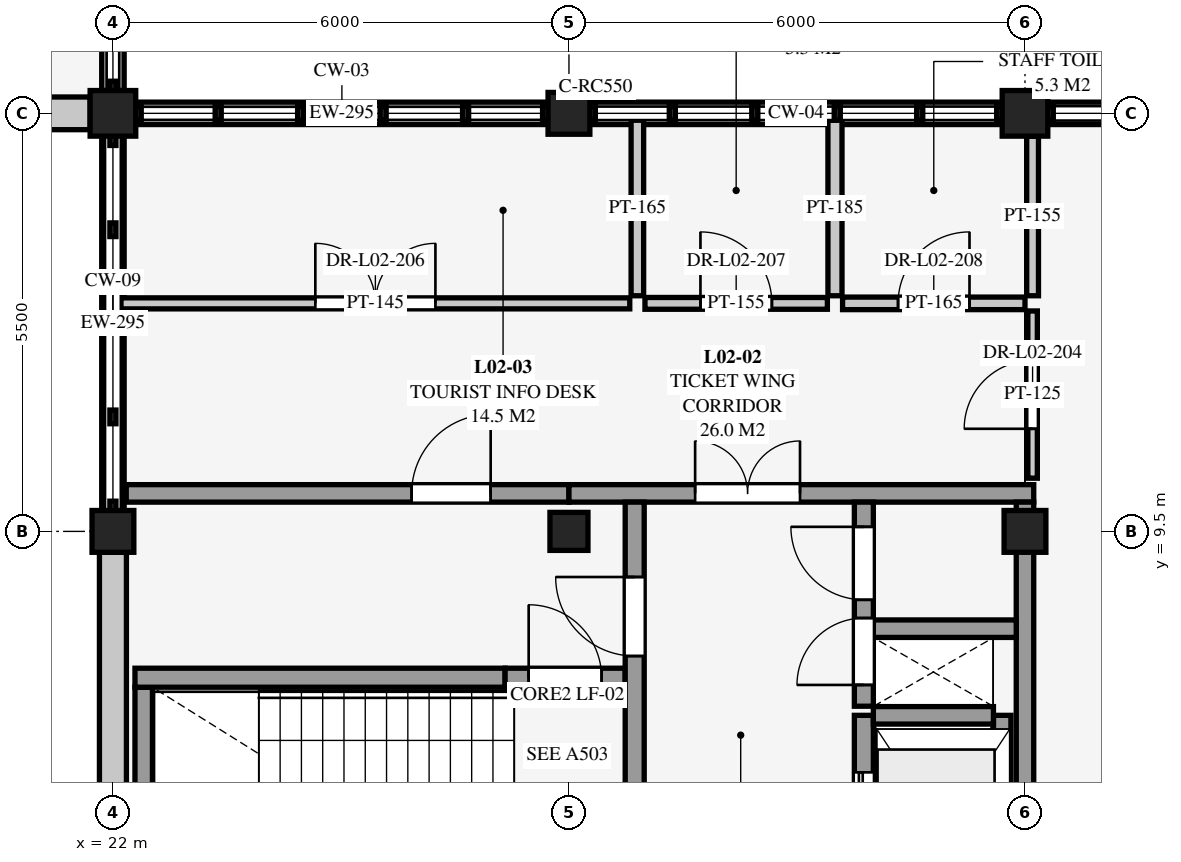
"""IFC4 building model, lengths in metres.
Left out: names, types, materials, properties, quantities, classifications, styles, units other than length and angle.
Written with IfcOpenShell. Run it as: python <this file> out.ifc"""

import sys

from ifc_helpers import new_model, si_unit, direction, frame, frame_2d, origin, origin_2d, place, context, subcontext, project, spatial, rectangle, extrude, element, fill, save


model = new_model("IFC4")
c1 = context("Model", 3, precision=1e-05, world=origin(), true_north=direction((0.0, 1.0)))
c2 = subcontext(c1, "Body", "Model", "MODEL_VIEW")
j1 = project(units=[si_unit("LENGTHUNIT", "METRE"), si_unit("PLANEANGLEUNIT", "RADIAN")], contexts=[c1])
p1 = place(None, origin())
s1 = spatial("IfcSite", under=j1, at=p1, CompositionType="ELEMENT")
p2 = place(p1, origin())
s2 = spatial("IfcBuilding", under=s1, at=p2, CompositionType="ELEMENT")
p3 = place(p2, frame((0.0, 0.0, 4.5)))
s3 = spatial("IfcBuildingStorey", under=s2, at=p3, CompositionType="ELEMENT", Elevation=4.5)
p4 = place(p3, frame((22.0, 9.5, 0.0), z_axis=(0.0, 0.0, 1.0), x_axis=(1.0, 0.0, 0.0)))
e1 = element("IfcColumn", 1, at=p4, inside=s3, PredefinedType="COLUMN", context=c2, shape_type="SweptSolid", body=[
    extrude(rectangle(XDim=0.55, YDim=0.55, at=origin_2d()), origin(), (0.0, 0.0, 1.0), 4.5),
])
p5 = place(p3, frame((22.0, 15.0, 0.0), z_axis=(0.0, 0.0, 1.0), x_axis=(1.0, 0.0, 0.0)))
e2 = element("IfcColumn", 2, at=p5, inside=s3, PredefinedType="COLUMN", context=c2, shape_type="SweptSolid", body=[
    extrude(rectangle(XDim=0.6, YDim=0.6, at=origin_2d()), origin(), (0.0, 0.0, 1.0), 4.5),
])
p6 = place(p3, frame((28.0, 9.5, 0.0), z_axis=(0.0, 0.0, 1.0), x_axis=(1.0, 0.0, 0.0)))
e3 = element("IfcColumn", 3, at=p6, inside=s3, PredefinedType="COLUMN", context=c2, shape_type="SweptSolid", body=[
    extrude(rectangle(XDim=0.5, YDim=0.5, at=origin_2d()), origin(), (0.0, 0.0, 1.0), 4.5),
])
for number, where, z_axis, x_axis in (
    (4, (28.0, 15.0, 0.0), (0.0, 0.0, 1.0), (1.0, 0.0, 0.0)),
    (5, (34.0, 9.5, 0.0), (0.0, 0.0, 1.0), (1.0, 0.0, 0.0)),
):
    element("IfcColumn", number, at=place(p3, frame(where, z_axis=z_axis, x_axis=x_axis)), inside=s3, PredefinedType="COLUMN", context=c2, shape_type="SweptSolid", body=[
        extrude(rectangle(XDim=0.55, YDim=0.55, at=origin_2d()), origin(), (0.0, 0.0, 1.0), 4.5),
    ])
p7 = place(p3, frame((34.0, 15.0, 0.0), z_axis=(0.0, 0.0, 1.0), x_axis=(1.0, 0.0, 0.0)))
e6 = element("IfcColumn", 6, at=p7, inside=s3, PredefinedType="COLUMN", context=c2, shape_type="SweptSolid", body=[
    extrude(rectangle(XDim=0.6, YDim=0.6, at=origin_2d()), origin(), (0.0, 0.0, 1.0), 4.5),
])
p8 = place(p3, frame((22.3, 15.0, 0.0), z_axis=(0.0, 0.0, 1.0), x_axis=(1.0, 0.0, 0.0)))
e7 = element("IfcWall", 7, at=p8, inside=s3, PredefinedType="SOLIDWALL", context=c2, shape_type="SweptSolid", body=[
    extrude(rectangle(XDim=5.425, YDim=0.295, at=frame_2d((2.712, 0.0))), origin(), (0.0, 0.0, 1.0), 0.26),
])
p9 = place(p3, frame((28.275, 15.0, 0.0), z_axis=(0.0, 0.0, 1.0), x_axis=(1.0, 0.0, 0.0)))
e8 = element("IfcWall", 8, at=p9, inside=s3, PredefinedType="SOLIDWALL", context=c2, shape_type="SweptSolid", body=[
    extrude(rectangle(XDim=5.425, YDim=0.295, at=frame_2d((2.712, 0.0))), origin(), (0.0, 0.0, 1.0), 0.31),
])
p10 = place(p3, frame((34.3, 15.0, 0.0), z_axis=(0.0, 0.0, 1.0), x_axis=(1.0, 0.0, 0.0)))
e9 = element("IfcWall", 9, at=p10, inside=s3, PredefinedType="SOLIDWALL", context=c2, shape_type="SweptSolid", body=[
    extrude(rectangle(XDim=5.3, YDim=0.295, at=frame_2d((2.65, 0.0))), origin(), (0.0, 0.0, 1.0), 0.41),
])
p11 = place(p3, frame((22.0, 4.25, 0.0), z_axis=(0.0, 0.0, 1.0), x_axis=(0.0, 1.0, 0.0)))
e10 = element("IfcWall", 10, at=p11, inside=s3, PredefinedType="SOLIDWALL", context=c2, shape_type="SweptSolid", body=[
    extrude(rectangle(XDim=4.975, YDim=0.355, at=frame_2d((2.488, 0.0))), origin(), (0.0, 0.0, 1.0), 3.809),
])
p12 = place(p3, frame((22.0, 9.775, 0.0), z_axis=(0.0, 0.0, 1.0), x_axis=(0.0, 1.0, 0.0)))
e11 = element("IfcWall", 11, at=p12, inside=s3, PredefinedType="SOLIDWALL", context=c2, shape_type="SweptSolid", body=[
    extrude(rectangle(XDim=4.925, YDim=0.295, at=frame_2d((2.462, 0.0))), origin(), (0.0, 0.0, 1.0), 0.16),
])
p13 = place(p3, frame((21.7, 15.0, 0.0), z_axis=(0.0, 0.0, 1.0), x_axis=(-1.0, 0.0, 0.0)))
e12 = element("IfcWall", 12, at=p13, inside=s3, PredefinedType="SOLIDWALL", context=c2, shape_type="SweptSolid", body=[
    extrude(rectangle(XDim=5.45, YDim=0.43, at=frame_2d((2.725, 0.0))), origin(), (0.0, 0.0, 1.0), 3.809),
])
p14 = place(p13, frame((1.925, 0.0, 1.25)))
e13 = element("IfcOpeningElement", 13, at=p14, cuts=e12, PredefinedType="OPENING", context=c2, shape_type="SweptSolid", body=[
    extrude(rectangle(XDim=1.6, YDim=1.5, at=frame_2d((0.8, 0.75))), frame((0.0, 0.225, 0.0), z_axis=(0.0, -1.0, 0.0), x_axis=(1.0, 0.0, 0.0)), (0.0, 0.0, 1.0), 0.45),
])
p15 = place(p3, frame((22.0, 20.675, 0.0), z_axis=(0.0, 0.0, 1.0), x_axis=(0.0, -1.0, 0.0)))
e14 = element("IfcWall", 14, at=p15, inside=s3, PredefinedType="SOLIDWALL", context=c2, shape_type="SweptSolid", body=[
    extrude(rectangle(XDim=5.375, YDim=0.295, at=frame_2d((2.688, 0.0))), origin(), (0.0, 0.0, 1.0), 0.21),
])
p16 = place(p3, frame((22.175, 10.0, 0.0), z_axis=(0.0, 0.0, 1.0), x_axis=(1.0, 0.0, 0.0)))
e15 = element("IfcWall", 15, at=p16, inside=s3, PredefinedType="SHEAR", context=c2, shape_type="SweptSolid", body=[
    extrude(rectangle(XDim=5.825, YDim=0.23, at=frame_2d((2.913, 0.0))), origin(), (0.0, 0.0, 1.0), 4.216),
])
p17 = place(p16, frame((3.755, 0.0, 0.0)))
e16 = element("IfcOpeningElement", 16, at=p17, cuts=e15, PredefinedType="OPENING", context=c2, shape_type="SweptSolid", body=[
    extrude(rectangle(XDim=1.04, YDim=2.14, at=frame_2d((0.52, 1.07))), frame((0.0, 0.125, 0.0), z_axis=(0.0, -1.0, 0.0), x_axis=(1.0, 0.0, 0.0)), (0.0, 0.0, 1.0), 0.25),
])
p18 = place(p3, frame((28.0, 10.0, 0.0), z_axis=(0.0, 0.0, 1.0), x_axis=(1.0, 0.0, 0.0)))
e17 = element("IfcWall", 17, at=p18, inside=s3, PredefinedType="SHEAR", context=c2, shape_type="SweptSolid", body=[
    extrude(rectangle(XDim=6.115, YDim=0.23, at=frame_2d((3.058, 0.0))), origin(), (0.0, 0.0, 1.0), 4.216),
])
p19 = place(p18, frame((1.66, 0.0, 0.0)))
e18 = element("IfcOpeningElement", 18, at=p19, cuts=e17, PredefinedType="OPENING", context=c2, shape_type="SweptSolid", body=[
    extrude(rectangle(XDim=1.38, YDim=2.16, at=frame_2d((0.69, 1.08))), frame((0.0, 0.125, 0.0), z_axis=(0.0, -1.0, 0.0), x_axis=(1.0, 0.0, 0.0)), (0.0, 0.0, 1.0), 0.25),
])
p20 = place(p3, frame((34.0, 4.25, 0.0), z_axis=(0.0, 0.0, 1.0), x_axis=(0.0, 1.0, 0.0)))
e19 = element("IfcWall", 19, at=p20, inside=s3, PredefinedType="SHEAR", context=c2, shape_type="SweptSolid", body=[
    extrude(rectangle(XDim=5.635, YDim=0.23, at=frame_2d((2.817, 0.0))), origin(), (0.0, 0.0, 1.0), 4.216),
])
p21 = place(p3, frame((22.405, 4.115, 0.0), z_axis=(0.0, 0.0, 1.0), x_axis=(0.0, 1.0, 0.0)))
e20 = element("IfcWall", 20, at=p21, inside=s3, PredefinedType="SHEAR", context=c2, shape_type="SweptSolid", body=[
    extrude(rectangle(XDim=3.335, YDim=0.23, at=frame_2d((1.667, 0.0))), origin(), (0.0, 0.0, 1.0), 4.5),
])
p22 = place(p3, frame((22.29, 7.575, 0.0), z_axis=(0.0, 0.0, 1.0), x_axis=(1.0, 0.0, 0.0)))
e21 = element("IfcWall", 21, at=p22, inside=s3, PredefinedType="SHEAR", context=c2, shape_type="SweptSolid", body=[
    extrude(rectangle(XDim=4.87, YDim=0.25, at=frame_2d((2.435, 0.0))), origin(), (0.0, 0.0, 1.0), 4.5),
])
p23 = place(p3, frame((27.16, 7.575, 0.0), z_axis=(0.0, 0.0, 1.0), x_axis=(1.0, 0.0, 0.0)))
e22 = element("IfcWall", 22, at=p23, inside=s3, PredefinedType="SHEAR", context=c2, shape_type="SweptSolid", body=[
    extrude(rectangle(XDim=1.58, YDim=0.25, at=frame_2d((0.79, 0.0))), origin(), (0.0, 0.0, 1.0), 4.216),
])
p24 = place(p23, frame((0.31, 0.0, 0.0)))
e23 = element("IfcOpeningElement", 23, at=p24, cuts=e22, PredefinedType="OPENING", context=c2, shape_type="SweptSolid", body=[
    extrude(rectangle(XDim=0.96, YDim=2.12, at=frame_2d((0.48, 1.06))), frame((0.0, 0.135, 0.0), z_axis=(0.0, -1.0, 0.0), x_axis=(1.0, 0.0, 0.0)), (0.0, 0.0, 1.0), 0.27),
])
p25 = place(p3, frame((28.865, 4.175, 0.0), z_axis=(0.0, 0.0, 1.0), x_axis=(0.0, 1.0, 0.0)))
e24 = element("IfcWall", 24, at=p25, inside=s3, PredefinedType="SHEAR", context=c2, shape_type="SweptSolid", body=[
    extrude(rectangle(XDim=5.71, YDim=0.25, at=frame_2d((2.855, 0.0))), origin(), (0.0, 0.0, 1.0), 4.216),
])
p26 = place(p25, frame((3.685, 0.0, 0.0)))
e25 = element("IfcOpeningElement", 25, at=p26, cuts=e24, PredefinedType="OPENING", context=c2, shape_type="SweptSolid", body=[
    extrude(rectangle(XDim=1.04, YDim=2.14, at=frame_2d((0.52, 1.07))), frame((0.0, 0.135, 0.0), z_axis=(0.0, -1.0, 0.0), x_axis=(1.0, 0.0, 0.0)), (0.0, 0.0, 1.0), 0.27),
])
p27 = place(p3, frame((31.88, 4.115, 0.0), z_axis=(0.0, 0.0, 1.0), x_axis=(0.0, 1.0, 0.0)))
e26 = element("IfcWall", 26, at=p27, inside=s3, PredefinedType="SHEAR", context=c2, shape_type="SweptSolid", body=[
    extrude(rectangle(XDim=2.965, YDim=0.25, at=frame_2d((1.482, 0.0))), origin(), (0.0, 0.0, 1.0), 4.5),
])
p28 = place(p27, frame((1.055, 0.0, 0.0)))
e27 = element("IfcOpeningElement", 27, at=p28, cuts=e26, PredefinedType="OPENING", context=c2, shape_type="SweptSolid", body=[
    extrude(rectangle(XDim=1.16, YDim=2.18, at=frame_2d((0.58, 1.09))), frame((0.0, 0.135, 0.0), z_axis=(0.0, -1.0, 0.0), x_axis=(1.0, 0.0, 0.0)), (0.0, 0.0, 1.0), 0.27),
])
p29 = place(p3, frame((33.7, 4.115, 0.0), z_axis=(0.0, 0.0, 1.0), x_axis=(0.0, 1.0, 0.0)))
e28 = element("IfcWall", 28, at=p29, inside=s3, PredefinedType="SHEAR", context=c2, shape_type="SweptSolid", body=[
    extrude(rectangle(XDim=2.965, YDim=0.23, at=frame_2d((1.482, 0.0))), origin(), (0.0, 0.0, 1.0), 4.5),
])
p30 = place(p3, frame((32.005, 7.08, 0.0), z_axis=(0.0, 0.0, 1.0), x_axis=(1.0, 0.0, 0.0)))
e29 = element("IfcWall", 29, at=p30, inside=s3, PredefinedType="SHEAR", context=c2, shape_type="SweptSolid", body=[
    extrude(rectangle(XDim=1.58, YDim=0.23, at=frame_2d((0.79, 0.0))), origin(), (0.0, 0.0, 1.0), 4.5),
])
p31 = place(p3, frame((31.88, 7.2, 0.0), z_axis=(0.0, 0.0, 1.0), x_axis=(0.0, 1.0, 0.0)))
e30 = element("IfcWall", 30, at=p31, inside=s3, PredefinedType="SHEAR", context=c2, shape_type="SweptSolid", body=[
    extrude(rectangle(XDim=2.685, YDim=0.25, at=frame_2d((1.343, 0.0))), origin(), (0.0, 0.0, 1.0), 4.216),
])
p32 = place(p31, frame((0.28, 0.0, 0.0)))
e31 = element("IfcOpeningElement", 31, at=p32, cuts=e30, PredefinedType="OPENING", context=c2, shape_type="SweptSolid", body=[
    extrude(rectangle(XDim=0.88, YDim=2.08, at=frame_2d((0.44, 1.04))), frame((0.0, 0.135, 0.0), z_axis=(0.0, -1.0, 0.0), x_axis=(1.0, 0.0, 0.0)), (0.0, 0.0, 1.0), 0.27),
])
p33 = place(p31, frame((1.4, 0.0, 0.0)))
e32 = element("IfcOpeningElement", 32, at=p33, cuts=e30, PredefinedType="OPENING", context=c2, shape_type="SweptSolid", body=[
    extrude(rectangle(XDim=0.96, YDim=2.12, at=frame_2d((0.48, 1.06))), frame((0.0, 0.135, 0.0), z_axis=(0.0, -1.0, 0.0), x_axis=(1.0, 0.0, 0.0)), (0.0, 0.0, 1.0), 0.27),
])
p34 = place(p3, frame((32.005, 8.22, 0.0), z_axis=(0.0, 0.0, 1.0), x_axis=(1.0, 0.0, 0.0)))
e33 = element("IfcWall", 33, at=p34, inside=s3, PredefinedType="SHEAR", context=c2, shape_type="SweptSolid", body=[
    extrude(rectangle(XDim=1.88, YDim=0.23, at=frame_2d((0.94, 0.0))), origin(), (0.0, 0.0, 1.0), 4.216),
])
p35 = place(p3, frame((34.1, 10.2, 0.0), z_axis=(0.0, 0.0, 1.0), x_axis=(0.0, 1.0, 0.0)))
e34 = element("IfcWall", 34, at=p35, inside=s3, PredefinedType="PARTITIONING", context=c2, shape_type="SweptSolid", body=[
    extrude(rectangle(XDim=2.2, YDim=0.125, at=frame_2d((1.1, 0.0))), origin(), (0.0, 0.0, 1.0), 4.216),
])
p36 = place(p35, frame((0.65, 0.0, 0.0)))
e35 = element("IfcOpeningElement", 35, at=p36, cuts=e34, PredefinedType="OPENING", context=c2, shape_type="SweptSolid", body=[
    extrude(rectangle(XDim=0.9, YDim=2.1, at=frame_2d((0.45, 1.05))), frame((0.0, 0.073, 0.0), z_axis=(0.0, -1.0, 0.0), x_axis=(1.0, 0.0, 0.0)), (0.0, 0.0, 1.0), 0.145),
])
p37 = place(p3, frame((34.1, 12.6, 0.0), z_axis=(0.0, 0.0, 1.0), x_axis=(0.0, 1.0, 0.0)))
e36 = element("IfcWall", 36, at=p37, inside=s3, PredefinedType="PARTITIONING", context=c2, shape_type="SweptSolid", body=[
    extrude(rectangle(XDim=2.098, YDim=0.155, at=frame_2d((1.049, 0.0))), origin(), (0.0, 0.0, 1.0), 4.216),
])
p38 = place(p3, frame((22.106, 12.5, 0.0), z_axis=(0.0, 0.0, 1.0), x_axis=(1.0, 0.0, 0.0)))
e37 = element("IfcWall", 37, at=p38, inside=s3, PredefinedType="PARTITIONING", context=c2, shape_type="SweptSolid", body=[
    extrude(rectangle(XDim=6.694, YDim=0.145, at=frame_2d((3.347, 0.0))), origin(), (0.0, 0.0, 1.0), 4.216),
])
p39 = place(p38, frame((2.557, 0.0, 0.0)))
e38 = element("IfcOpeningElement", 38, at=p39, cuts=e37, PredefinedType="OPENING", context=c2, shape_type="SweptSolid", body=[
    extrude(rectangle(XDim=1.58, YDim=2.2, at=frame_2d((0.79, 1.1))), frame((0.0, 0.083, 0.0), z_axis=(0.0, -1.0, 0.0), x_axis=(1.0, 0.0, 0.0)), (0.0, 0.0, 1.0), 0.165),
])
p40 = place(p3, frame((29.0, 12.5, 0.0), z_axis=(0.0, 0.0, 1.0), x_axis=(1.0, 0.0, 0.0)))
e39 = element("IfcWall", 39, at=p40, inside=s3, PredefinedType="PARTITIONING", context=c2, shape_type="SweptSolid", body=[
    extrude(rectangle(XDim=2.4, YDim=0.155, at=frame_2d((1.2, 0.0))), origin(), (0.0, 0.0, 1.0), 4.216),
])
p41 = place(p40, frame((0.73, 0.0, 0.0)))
e40 = element("IfcOpeningElement", 40, at=p41, cuts=e39, PredefinedType="OPENING", context=c2, shape_type="SweptSolid", body=[
    extrude(rectangle(XDim=0.94, YDim=2.1, at=frame_2d((0.47, 1.05))), frame((0.0, 0.088, 0.0), z_axis=(0.0, -1.0, 0.0), x_axis=(1.0, 0.0, 0.0)), (0.0, 0.0, 1.0), 0.175),
])
p42 = place(p3, frame((31.6, 12.5, 0.0), z_axis=(0.0, 0.0, 1.0), x_axis=(1.0, 0.0, 0.0)))
e41 = element("IfcWall", 41, at=p42, inside=s3, PredefinedType="PARTITIONING", context=c2, shape_type="SweptSolid", body=[
    extrude(rectangle(XDim=2.4, YDim=0.165, at=frame_2d((1.2, 0.0))), origin(), (0.0, 0.0, 1.0), 4.216),
])
p43 = place(p42, frame((0.73, 0.0, 0.0)))
e42 = element("IfcOpeningElement", 42, at=p43, cuts=e41, PredefinedType="OPENING", context=c2, shape_type="SweptSolid", body=[
    extrude(rectangle(XDim=0.94, YDim=2.1, at=frame_2d((0.47, 1.05))), frame((0.0, 0.093, 0.0), z_axis=(0.0, -1.0, 0.0), x_axis=(1.0, 0.0, 0.0)), (0.0, 0.0, 1.0), 0.185),
])
p44 = place(p3, frame((28.9, 12.6, 0.0), z_axis=(0.0, 0.0, 1.0), x_axis=(0.0, 1.0, 0.0)))
e43 = element("IfcWall", 43, at=p44, inside=s3, PredefinedType="PARTITIONING", context=c2, shape_type="SweptSolid", body=[
    extrude(rectangle(XDim=2.309, YDim=0.165, at=frame_2d((1.154, 0.0))), origin(), (0.0, 0.0, 1.0), 4.216),
])
p45 = place(p3, frame((31.5, 12.6, 0.0), z_axis=(0.0, 0.0, 1.0), x_axis=(0.0, 1.0, 0.0)))
e44 = element("IfcWall", 44, at=p45, inside=s3, PredefinedType="PARTITIONING", context=c2, shape_type="SweptSolid", body=[
    extrude(rectangle(XDim=2.309, YDim=0.185, at=frame_2d((1.154, 0.0))), origin(), (0.0, 0.0, 1.0), 4.216),
])
p46 = place(p17, origin())
e45 = element("IfcDoor", 45, at=p46, inside=s3, OperationType="SINGLE_SWING_RIGHT", PredefinedType="DOOR", context=c2, shape_type="SweptSolid", body=[
    extrude(rectangle(XDim=1.04, YDim=2.14, at=frame_2d((0.52, 1.07))), frame((0.0, 0.025, 0.0), z_axis=(0.0, -1.0, 0.0), x_axis=(1.0, 0.0, 0.0)), (0.0, 0.0, 1.0), 0.05),
])
fill(e16, e45)
p47 = place(p19, origin())
e46 = element("IfcDoor", 46, at=p47, inside=s3, OperationType="DOUBLE_DOOR_SINGLE_SWING", PredefinedType="DOOR", context=c2, shape_type="SweptSolid", body=[
    extrude(rectangle(XDim=1.38, YDim=2.16, at=frame_2d((0.69, 1.08))), frame((0.0, 0.025, 0.0), z_axis=(0.0, -1.0, 0.0), x_axis=(1.0, 0.0, 0.0)), (0.0, 0.0, 1.0), 0.05),
])
fill(e18, e46)
p48 = place(p24, origin())
e47 = element("IfcDoor", 47, at=p48, inside=s3, OperationType="SINGLE_SWING_LEFT", PredefinedType="DOOR", context=c2, shape_type="SweptSolid", body=[
    extrude(rectangle(XDim=0.96, YDim=2.12, at=frame_2d((0.48, 1.06))), frame((0.0, 0.025, 0.0), z_axis=(0.0, -1.0, 0.0), x_axis=(1.0, 0.0, 0.0)), (0.0, 0.0, 1.0), 0.05),
])
fill(e23, e47)
p49 = place(p26, origin())
e48 = element("IfcDoor", 48, at=p49, inside=s3, OperationType="SINGLE_SWING_RIGHT", PredefinedType="DOOR", context=c2, shape_type="SweptSolid", body=[
    extrude(rectangle(XDim=1.04, YDim=2.14, at=frame_2d((0.52, 1.07))), frame((0.0, 0.025, 0.0), z_axis=(0.0, -1.0, 0.0), x_axis=(1.0, 0.0, 0.0)), (0.0, 0.0, 1.0), 0.05),
])
fill(e25, e48)
p50 = place(p28, origin())
e49 = element("IfcDoor", 49, at=p50, inside=s3, OperationType="DOUBLE_DOOR_SLIDING", PredefinedType="DOOR", context=c2, shape_type="SweptSolid", body=[
    extrude(rectangle(XDim=1.16, YDim=2.18, at=frame_2d((0.58, 1.09))), frame((0.0, 0.025, 0.0), z_axis=(0.0, -1.0, 0.0), x_axis=(1.0, 0.0, 0.0)), (0.0, 0.0, 1.0), 0.05),
])
fill(e27, e49)
p51 = place(p32, origin())
e50 = element("IfcDoor", 50, at=p51, inside=s3, OperationType="SINGLE_SWING_LEFT", PredefinedType="DOOR", context=c2, shape_type="SweptSolid", body=[
    extrude(rectangle(XDim=0.88, YDim=2.08, at=frame_2d((0.44, 1.04))), frame((0.0, 0.025, 0.0), z_axis=(0.0, -1.0, 0.0), x_axis=(1.0, 0.0, 0.0)), (0.0, 0.0, 1.0), 0.05),
])
fill(e31, e50)
p52 = place(p33, origin())
e51 = element("IfcDoor", 51, at=p52, inside=s3, OperationType="SINGLE_SWING_RIGHT", PredefinedType="DOOR", context=c2, shape_type="SweptSolid", body=[
    extrude(rectangle(XDim=0.96, YDim=2.12, at=frame_2d((0.48, 1.06))), frame((0.0, 0.025, 0.0), z_axis=(0.0, -1.0, 0.0), x_axis=(1.0, 0.0, 0.0)), (0.0, 0.0, 1.0), 0.05),
])
fill(e32, e51)
p53 = place(p36, origin())
e52 = element("IfcDoor", 52, at=p53, inside=s3, OperationType="SINGLE_SWING_LEFT", PredefinedType="DOOR", context=c2, shape_type="SweptSolid", body=[
    extrude(rectangle(XDim=0.9, YDim=2.1, at=frame_2d((0.45, 1.05))), frame((0.0, 0.025, 0.0), z_axis=(0.0, -1.0, 0.0), x_axis=(1.0, 0.0, 0.0)), (0.0, 0.0, 1.0), 0.05),
])
fill(e35, e52)
p54 = place(p39, origin())
e53 = element("IfcDoor", 53, at=p54, inside=s3, OperationType="DOUBLE_DOOR_SINGLE_SWING", PredefinedType="DOOR", context=c2, shape_type="SweptSolid", body=[
    extrude(rectangle(XDim=1.58, YDim=2.2, at=frame_2d((0.79, 1.1))), frame((0.0, 0.025, 0.0), z_axis=(0.0, -1.0, 0.0), x_axis=(1.0, 0.0, 0.0)), (0.0, 0.0, 1.0), 0.05),
])
fill(e38, e53)
p55 = place(p41, origin())
e54 = element("IfcDoor", 54, at=p55, inside=s3, OperationType="SINGLE_SWING_LEFT", PredefinedType="DOOR", context=c2, shape_type="SweptSolid", body=[
    extrude(rectangle(XDim=0.94, YDim=2.1, at=frame_2d((0.47, 1.05))), frame((0.0, 0.025, 0.0), z_axis=(0.0, -1.0, 0.0), x_axis=(1.0, 0.0, 0.0)), (0.0, 0.0, 1.0), 0.05),
])
fill(e40, e54)
p56 = place(p43, origin())
e55 = element("IfcDoor", 55, at=p56, inside=s3, OperationType="SINGLE_SWING_RIGHT", PredefinedType="DOOR", context=c2, shape_type="SweptSolid", body=[
    extrude(rectangle(XDim=0.94, YDim=2.1, at=frame_2d((0.47, 1.05))), frame((0.0, 0.025, 0.0), z_axis=(0.0, -1.0, 0.0), x_axis=(1.0, 0.0, 0.0)), (0.0, 0.0, 1.0), 0.05),
])
fill(e42, e55)
save(model, sys.argv[1])
